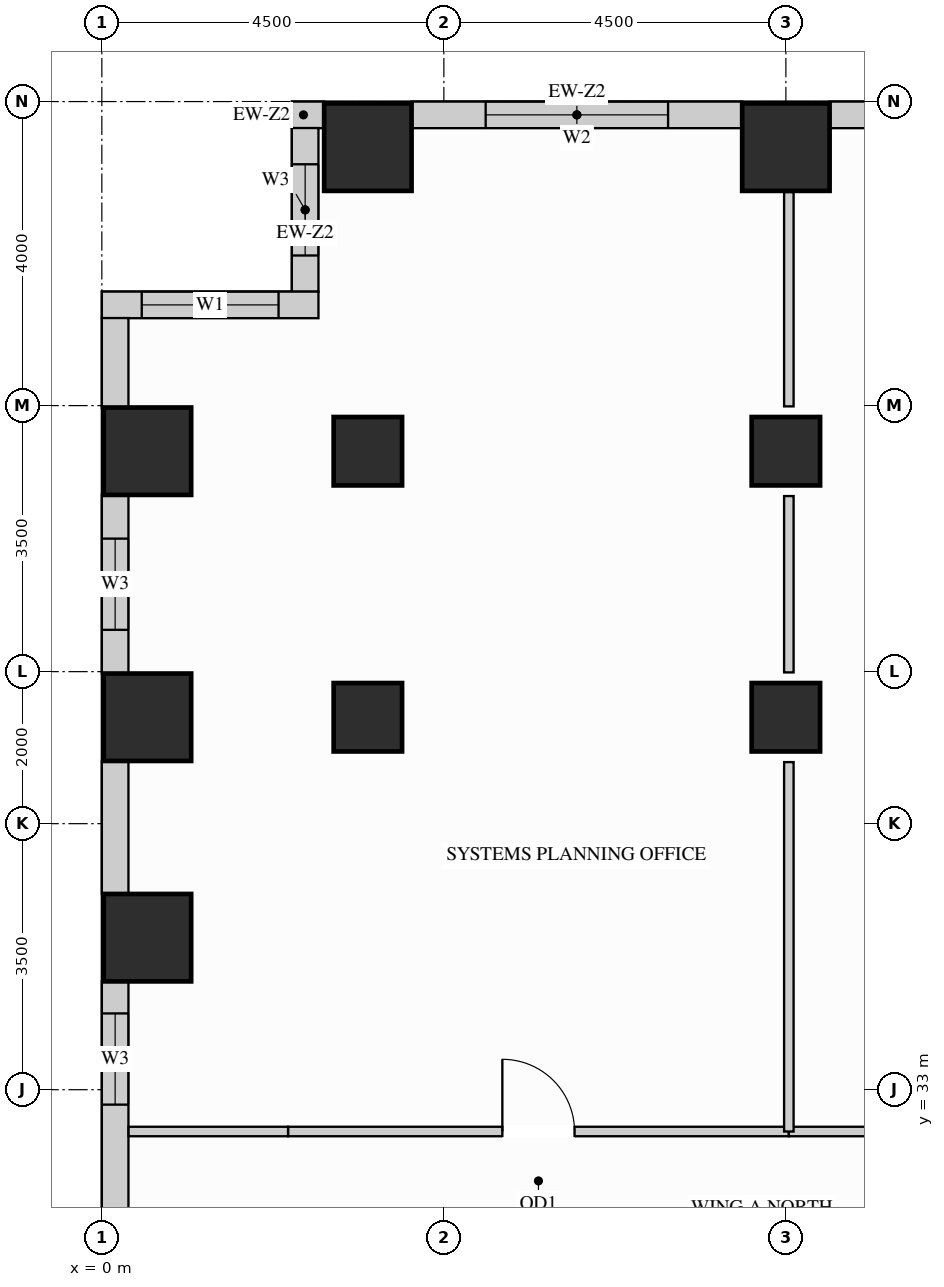
"""IFC4 building model, lengths in metres.
Left out: names, types, materials, properties, quantities, classifications, styles, units other than length and angle.
Written with IfcOpenShell. Run it as: python <this file> out.ifc"""

import sys

from ifc_helpers import new_model, si_unit, direction, frame, frame_2d, origin, origin_2d, place, context, subcontext, project, spatial, rectangle, extrude, source, transform, mapped, element, fill, save


model = new_model("IFC4")
c1 = context("Model", 3, precision=1e-05, world=origin(), true_north=direction((0.0, 1.0)))
c2 = subcontext(c1, "Body", "Model", "MODEL_VIEW")
j1 = project(units=[si_unit("LENGTHUNIT", "METRE"), si_unit("PLANEANGLEUNIT", "RADIAN")], contexts=[c1])
p1 = place(None, origin())
s1 = spatial("IfcSite", under=j1, at=p1, CompositionType="ELEMENT")
p2 = place(p1, origin())
s2 = spatial("IfcBuilding", under=s1, at=p2, CompositionType="ELEMENT")
p3 = place(p2, frame((0.0, 0.0, 106.2)))
s3 = spatial("IfcBuildingStorey", under=s2, at=p3, CompositionType="ELEMENT", Elevation=106.2)
m1 = source(origin(), c2, "Body", "SweptSolid", [
    extrude(rectangle(XDim=0.9, YDim=0.9, at=origin_2d()), origin(), (0.0, 0.0, 1.0), 3.38),
])
for number, where, z_axis, x_axis in (
    (1, (3.5, 37.9, 0.0), (0.0, 0.0, 1.0), (1.0, 0.0, 0.0)),
    (2, (3.5, 41.4, 0.0), (0.0, 0.0, 1.0), (1.0, 0.0, 0.0)),
    (3, (9.0, 37.9, 0.0), (0.0, 0.0, 1.0), (1.0, 0.0, 0.0)),
    (4, (9.0, 41.4, 0.0), (0.0, 0.0, 1.0), (1.0, 0.0, 0.0)),
):
    element("IfcColumn", number, at=place(p3, frame(where, z_axis=z_axis, x_axis=x_axis)), inside=s3, PredefinedType="COLUMN", context=c2, shape_type="MappedRepresentation", body=[
        mapped(m1, transform((0.0, 0.0, 0.0), x_axis=(1.0, 0.0, 0.0), y_axis=(0.0, 1.0, 0.0), z_axis=(0.0, 0.0, 1.0))),
    ])
m2 = source(origin(), c2, "Body", "SweptSolid", [
    extrude(rectangle(XDim=1.15, YDim=1.15, at=origin_2d()), origin(), (0.0, 0.0, 1.0), 3.38),
])
for number, where, z_axis, x_axis in (
    (5, (3.5, 45.4, 0.0), (0.0, 0.0, 1.0), (1.0, 0.0, 0.0)),
    (6, (9.0, 45.4, 0.0), (0.0, 0.0, 1.0), (1.0, 0.0, 0.0)),
    (7, (0.6, 35.0, 0.0), (0.0, 0.0, 1.0), (1.0, 0.0, 0.0)),
    (8, (0.6, 37.9, 0.0), (0.0, 0.0, 1.0), (1.0, 0.0, 0.0)),
    (9, (0.6, 41.4, 0.0), (0.0, 0.0, 1.0), (1.0, 0.0, 0.0)),
):
    element("IfcColumn", number, at=place(p3, frame(where, z_axis=z_axis, x_axis=x_axis)), inside=s3, PredefinedType="COLUMN", context=c2, shape_type="MappedRepresentation", body=[
        mapped(m2, transform((0.0, 0.0, 0.0), x_axis=(1.0, 0.0, 0.0), y_axis=(0.0, 1.0, 0.0), z_axis=(0.0, 0.0, 1.0))),
    ])
p4 = place(p3, frame((13.927, 45.825, 0.0), z_axis=(0.0, 0.0, 1.0), x_axis=(-1.0, 0.0, 0.0)))
e10 = element("IfcWall", 10, at=p4, inside=s3, PredefinedType="SOLIDWALL", context=c2, shape_type="SweptSolid", body=[
    extrude(rectangle(XDim=4.354, YDim=0.35, at=frame_2d((2.177, 0.0))), origin(), (0.0, 0.0, 1.0), 3.365),
])
p5 = place(p4, frame((0.977, 0.0, 0.78)))
e11 = element("IfcOpeningElement", 11, at=p5, cuts=e10, PredefinedType="OPENING", context=c2, shape_type="SweptSolid", body=[
    extrude(rectangle(XDim=2.4, YDim=2.1, at=frame_2d((1.2, 1.05))), frame((0.0, 0.185, 0.0), z_axis=(0.0, -1.0, 0.0), x_axis=(1.0, 0.0, 0.0)), (0.0, 0.0, 1.0), 0.37),
])
p6 = place(p3, frame((8.427, 45.825, 0.0), z_axis=(0.0, 0.0, 1.0), x_axis=(-1.0, 0.0, 0.0)))
e12 = element("IfcWall", 12, at=p6, inside=s3, PredefinedType="SOLIDWALL", context=c2, shape_type="SweptSolid", body=[
    extrude(rectangle(XDim=4.354, YDim=0.35, at=frame_2d((2.177, 0.0))), origin(), (0.0, 0.0, 1.0), 3.365),
])
p7 = place(p6, frame((0.977, 0.0, 0.78)))
e13 = element("IfcOpeningElement", 13, at=p7, cuts=e12, PredefinedType="OPENING", context=c2, shape_type="SweptSolid", body=[
    extrude(rectangle(XDim=2.4, YDim=2.1, at=frame_2d((1.2, 1.05))), frame((0.0, 0.185, 0.0), z_axis=(0.0, -1.0, 0.0), x_axis=(1.0, 0.0, 0.0)), (0.0, 0.0, 1.0), 0.37),
])
m3 = source(origin(), c2, "Body", "SweptSolid", [
    extrude(rectangle(XDim=0.427, YDim=0.35, at=frame_2d((0.213, 0.0))), origin(), (0.0, 0.0, 1.0), 3.365),
])
p8 = place(p3, frame((2.927, 45.825, 0.0), z_axis=(0.0, 0.0, 1.0), x_axis=(-1.0, 0.0, 0.0)))
e14 = element("IfcWall", 14, at=p8, inside=s3, PredefinedType="SOLIDWALL", context=c2, shape_type="MappedRepresentation", body=[
    mapped(m3, transform((0.0, 0.0, 0.0), x_axis=(1.0, 0.0, 0.0), y_axis=(0.0, 1.0, 0.0), z_axis=(0.0, 0.0, 1.0))),
])
p9 = place(p3, frame((2.675, 45.652, 0.0), z_axis=(0.0, 0.0, 1.0), x_axis=(0.0, -1.0, 0.0)))
e15 = element("IfcWall", 15, at=p9, inside=s3, PredefinedType="SOLIDWALL", context=c2, shape_type="SweptSolid", body=[
    extrude(rectangle(XDim=2.154, YDim=0.35, at=frame_2d((1.077, 0.0))), origin(), (0.0, 0.0, 1.0), 3.365),
])
p10 = place(p9, frame((0.477, 0.0, 0.78)))
e16 = element("IfcOpeningElement", 16, at=p10, cuts=e15, PredefinedType="OPENING", context=c2, shape_type="SweptSolid", body=[
    extrude(rectangle(XDim=1.2, YDim=2.1, at=frame_2d((0.6, 1.05))), frame((0.0, 0.185, 0.0), z_axis=(0.0, -1.0, 0.0), x_axis=(1.0, 0.0, 0.0)), (0.0, 0.0, 1.0), 0.37),
])
p11 = place(p3, frame((2.85, 43.325, 0.0), z_axis=(0.0, 0.0, 1.0), x_axis=(-1.0, 0.0, 0.0)))
e17 = element("IfcWall", 17, at=p11, inside=s3, PredefinedType="SOLIDWALL", context=c2, shape_type="SweptSolid", body=[
    extrude(rectangle(XDim=2.85, YDim=0.35, at=frame_2d((1.425, 0.0))), origin(), (0.0, 0.0, 1.0), 3.365),
])
p12 = place(p11, frame((0.525, 0.0, 0.78)))
e18 = element("IfcOpeningElement", 18, at=p12, cuts=e17, PredefinedType="OPENING", context=c2, shape_type="SweptSolid", body=[
    extrude(rectangle(XDim=1.8, YDim=2.1, at=frame_2d((0.9, 1.05))), frame((0.0, 0.185, 0.0), z_axis=(0.0, -1.0, 0.0), x_axis=(1.0, 0.0, 0.0)), (0.0, 0.0, 1.0), 0.37),
])
m4 = source(origin(), c2, "Body", "SweptSolid", [
    extrude(rectangle(XDim=1.179, YDim=0.35, at=frame_2d((0.59, 0.0))), origin(), (0.0, 0.0, 1.0), 3.365),
])
p13 = place(p3, frame((0.175, 43.152, 0.0), z_axis=(0.0, 0.0, 1.0), x_axis=(0.0, -1.0, 0.0)))
e19 = element("IfcWall", 19, at=p13, inside=s3, PredefinedType="SOLIDWALL", context=c2, shape_type="MappedRepresentation", body=[
    mapped(m4, transform((0.0, 0.0, 0.0), x_axis=(1.0, 0.0, 0.0), y_axis=(0.0, 1.0, 0.0), z_axis=(0.0, 0.0, 1.0))),
])
p14 = place(p3, frame((0.175, 40.827, 0.0), z_axis=(0.0, 0.0, 1.0), x_axis=(0.0, -1.0, 0.0)))
e20 = element("IfcWall", 20, at=p14, inside=s3, PredefinedType="SOLIDWALL", context=c2, shape_type="SweptSolid", body=[
    extrude(rectangle(XDim=2.354, YDim=0.35, at=frame_2d((1.177, 0.0))), origin(), (0.0, 0.0, 1.0), 3.365),
])
p15 = place(p14, frame((0.577, 0.0, 0.78)))
e21 = element("IfcOpeningElement", 21, at=p15, cuts=e20, PredefinedType="OPENING", context=c2, shape_type="SweptSolid", body=[
    extrude(rectangle(XDim=1.2, YDim=2.1, at=frame_2d((0.6, 1.05))), frame((0.0, 0.185, 0.0), z_axis=(0.0, -1.0, 0.0), x_axis=(1.0, 0.0, 0.0)), (0.0, 0.0, 1.0), 0.37),
])
m5 = source(origin(), c2, "Body", "SweptSolid", [
    extrude(rectangle(XDim=1.754, YDim=0.35, at=frame_2d((0.877, 0.0))), origin(), (0.0, 0.0, 1.0), 3.365),
])
p16 = place(p3, frame((0.175, 37.327, 0.0), z_axis=(0.0, 0.0, 1.0), x_axis=(0.0, -1.0, 0.0)))
e22 = element("IfcWall", 22, at=p16, inside=s3, PredefinedType="SOLIDWALL", context=c2, shape_type="MappedRepresentation", body=[
    mapped(m5, transform((0.0, 0.0, 0.0), x_axis=(1.0, 0.0, 0.0), y_axis=(0.0, 1.0, 0.0), z_axis=(0.0, 0.0, 1.0))),
])
p17 = place(p3, frame((0.175, 34.427, 0.0), z_axis=(0.0, 0.0, 1.0), x_axis=(0.0, -1.0, 0.0)))
e23 = element("IfcWall", 23, at=p17, inside=s3, PredefinedType="SOLIDWALL", context=c2, shape_type="SweptSolid", body=[
    extrude(rectangle(XDim=3.354, YDim=0.35, at=frame_2d((1.677, 0.0))), origin(), (0.0, 0.0, 1.0), 3.365),
])
p18 = place(p17, frame((0.424, 0.0, 0.78)))
e24 = element("IfcOpeningElement", 24, at=p18, cuts=e23, PredefinedType="OPENING", context=c2, shape_type="SweptSolid", body=[
    extrude(rectangle(XDim=1.2, YDim=2.1, at=frame_2d((0.6, 1.05))), frame((0.0, 0.185, 0.0), z_axis=(0.0, -1.0, 0.0), x_axis=(1.0, 0.0, 0.0)), (0.0, 0.0, 1.0), 0.37),
])
p19 = place(p3, frame((2.45, 32.45, 0.0), z_axis=(0.0, 0.0, 1.0), x_axis=(1.0, 0.0, 0.0)))
e25 = element("IfcWall", 25, at=p19, inside=s3, PredefinedType="PARTITIONING", context=c2, shape_type="SweptSolid", body=[
    extrude(rectangle(XDim=6.589, YDim=0.125, at=frame_2d((3.294, 0.0))), origin(), (0.0, 0.0, 1.0), 3.365),
])
p20 = place(p19, frame((2.82, 0.0, 0.0)))
e26 = element("IfcOpeningElement", 26, at=p20, cuts=e25, PredefinedType="OPENING", context=c2, shape_type="SweptSolid", body=[
    extrude(rectangle(XDim=0.95, YDim=2.15, at=frame_2d((0.475, 1.075))), frame((0.0, 0.073, 0.0), z_axis=(0.0, -1.0, 0.0), x_axis=(1.0, 0.0, 0.0)), (0.0, 0.0, 1.0), 0.145),
])
p21 = place(p3, frame((9.039, 32.45, 0.0), z_axis=(0.0, 0.0, 1.0), x_axis=(1.0, 0.0, 0.0)))
e27 = element("IfcWall", 27, at=p21, inside=s3, PredefinedType="PARTITIONING", context=c2, shape_type="SweptSolid", body=[
    extrude(rectangle(XDim=8.011, YDim=0.125, at=frame_2d((4.005, 0.0))), origin(), (0.0, 0.0, 1.0), 3.365),
])
p22 = place(p21, frame((3.531, 0.0, 0.0)))
e28 = element("IfcOpeningElement", 28, at=p22, cuts=e27, PredefinedType="OPENING", context=c2, shape_type="SweptSolid", body=[
    extrude(rectangle(XDim=0.95, YDim=2.15, at=frame_2d((0.475, 1.075))), frame((0.0, 0.073, 0.0), z_axis=(0.0, -1.0, 0.0), x_axis=(1.0, 0.0, 0.0)), (0.0, 0.0, 1.0), 0.145),
])
m6 = source(origin(), c2, "Body", "SweptSolid", [
    extrude(rectangle(XDim=2.098, YDim=0.125, at=frame_2d((1.049, 0.0))), origin(), (0.0, 0.0, 1.0), 3.365),
])
p23 = place(p3, frame((0.352, 32.45, 0.0), z_axis=(0.0, 0.0, 1.0), x_axis=(1.0, 0.0, 0.0)))
e29 = element("IfcWall", 29, at=p23, inside=s3, PredefinedType="PARTITIONING", context=c2, shape_type="MappedRepresentation", body=[
    mapped(m6, transform((0.0, 0.0, 0.0), x_axis=(1.0, 0.0, 0.0), y_axis=(0.0, 1.0, 0.0), z_axis=(0.0, 0.0, 1.0))),
])
m7 = source(origin(), c2, "Body", "SweptSolid", [
    extrude(rectangle(XDim=4.86, YDim=0.125, at=frame_2d((2.43, 0.0))), origin(), (0.0, 0.0, 1.0), 3.365),
])
p24 = place(p3, frame((9.039, 32.45, 0.0), z_axis=(0.0, 0.0, 1.0), x_axis=(0.0, 1.0, 0.0)))
e30 = element("IfcWall", 30, at=p24, inside=s3, PredefinedType="PARTITIONING", context=c2, shape_type="MappedRepresentation", body=[
    mapped(m7, transform((0.0, 0.0, 0.0), x_axis=(1.0, 0.0, 0.0), y_axis=(0.0, 1.0, 0.0), z_axis=(0.0, 0.0, 1.0))),
])
m8 = source(origin(), c2, "Body", "SweptSolid", [
    extrude(rectangle(XDim=2.32, YDim=0.125, at=frame_2d((1.16, 0.0))), origin(), (0.0, 0.0, 1.0), 2.677),
])
p25 = place(p3, frame((9.039, 38.49, 0.0), z_axis=(0.0, 0.0, 1.0), x_axis=(0.0, 1.0, 0.0)))
e31 = element("IfcWall", 31, at=p25, inside=s3, PredefinedType="PARTITIONING", context=c2, shape_type="MappedRepresentation", body=[
    mapped(m8, transform((0.0, 0.0, 0.0), x_axis=(1.0, 0.0, 0.0), y_axis=(0.0, 1.0, 0.0), z_axis=(0.0, 0.0, 1.0))),
])
m9 = source(origin(), c2, "Body", "SweptSolid", [
    extrude(rectangle(XDim=2.82, YDim=0.125, at=frame_2d((1.41, 0.0))), origin(), (0.0, 0.0, 1.0), 2.677),
])
p26 = place(p3, frame((9.039, 41.99, 0.0), z_axis=(0.0, 0.0, 1.0), x_axis=(0.0, 1.0, 0.0)))
e32 = element("IfcWall", 32, at=p26, inside=s3, PredefinedType="PARTITIONING", context=c2, shape_type="MappedRepresentation", body=[
    mapped(m9, transform((0.0, 0.0, 0.0), x_axis=(1.0, 0.0, 0.0), y_axis=(0.0, 1.0, 0.0), z_axis=(0.0, 0.0, 1.0))),
])
m10 = source(origin(), c2, "Body", "SweptSolid", [
    extrude(rectangle(XDim=0.95, YDim=2.15, at=frame_2d((0.475, 1.075))), frame((0.0, 0.025, 0.0), z_axis=(0.0, -1.0, 0.0), x_axis=(1.0, 0.0, 0.0)), (0.0, 0.0, 1.0), 0.05),
])
p27 = place(p20, origin())
e33 = element("IfcDoor", 33, at=p27, inside=s3, OperationType="SINGLE_SWING_LEFT", PredefinedType="DOOR", context=c2, shape_type="MappedRepresentation", body=[
    mapped(m10, transform((0.0, 0.0, 0.0), x_axis=(1.0, 0.0, 0.0), y_axis=(0.0, 1.0, 0.0), z_axis=(0.0, 0.0, 1.0))),
])
fill(e26, e33)
m11 = source(origin(), c2, "Body", "SweptSolid", [
    extrude(rectangle(XDim=1.8, YDim=2.1, at=frame_2d((0.9, 1.05))), frame((0.0, 0.03, 0.0), z_axis=(0.0, -1.0, 0.0), x_axis=(1.0, 0.0, 0.0)), (0.0, 0.0, 1.0), 0.06),
])
p28 = place(p12, origin())
e34 = element("IfcWindow", 34, at=p28, inside=s3, PartitioningType="SINGLE_PANEL", PredefinedType="WINDOW", context=c2, shape_type="MappedRepresentation", body=[
    mapped(m11, transform((0.0, 0.0, 0.0), x_axis=(1.0, 0.0, 0.0), y_axis=(0.0, 1.0, 0.0), z_axis=(0.0, 0.0, 1.0))),
])
fill(e18, e34)
m12 = source(origin(), c2, "Body", "SweptSolid", [
    extrude(rectangle(XDim=2.4, YDim=2.1, at=frame_2d((1.2, 1.05))), frame((0.0, 0.03, 0.0), z_axis=(0.0, -1.0, 0.0), x_axis=(1.0, 0.0, 0.0)), (0.0, 0.0, 1.0), 0.06),
])
p29 = place(p7, origin())
e35 = element("IfcWindow", 35, at=p29, inside=s3, PartitioningType="SINGLE_PANEL", PredefinedType="WINDOW", context=c2, shape_type="MappedRepresentation", body=[
    mapped(m12, transform((0.0, 0.0, 0.0), x_axis=(1.0, 0.0, 0.0), y_axis=(0.0, 1.0, 0.0), z_axis=(0.0, 0.0, 1.0))),
])
fill(e13, e35)
m13 = source(origin(), c2, "Body", "SweptSolid", [
    extrude(rectangle(XDim=1.2, YDim=2.1, at=frame_2d((0.6, 1.05))), frame((0.0, 0.03, 0.0), z_axis=(0.0, -1.0, 0.0), x_axis=(1.0, 0.0, 0.0)), (0.0, 0.0, 1.0), 0.06),
])
p30 = place(p10, origin())
e36 = element("IfcWindow", 36, at=p30, inside=s3, PartitioningType="SINGLE_PANEL", PredefinedType="WINDOW", context=c2, shape_type="MappedRepresentation", body=[
    mapped(m13, transform((0.0, 0.0, 0.0), x_axis=(1.0, 0.0, 0.0), y_axis=(0.0, 1.0, 0.0), z_axis=(0.0, 0.0, 1.0))),
])
fill(e16, e36)
p31 = place(p15, origin())
e37 = element("IfcWindow", 37, at=p31, inside=s3, PartitioningType="SINGLE_PANEL", PredefinedType="WINDOW", context=c2, shape_type="MappedRepresentation", body=[
    mapped(m13, transform((0.0, 0.0, 0.0), x_axis=(1.0, 0.0, 0.0), y_axis=(0.0, 1.0, 0.0), z_axis=(0.0, 0.0, 1.0))),
])
fill(e21, e37)
p32 = place(p18, origin())
e38 = element("IfcWindow", 38, at=p32, inside=s3, PartitioningType="SINGLE_PANEL", PredefinedType="WINDOW", context=c2, shape_type="MappedRepresentation", body=[
    mapped(m13, transform((0.0, 0.0, 0.0), x_axis=(1.0, 0.0, 0.0), y_axis=(0.0, 1.0, 0.0), z_axis=(0.0, 0.0, 1.0))),
])
fill(e24, e38)
save(model, sys.argv[1])
